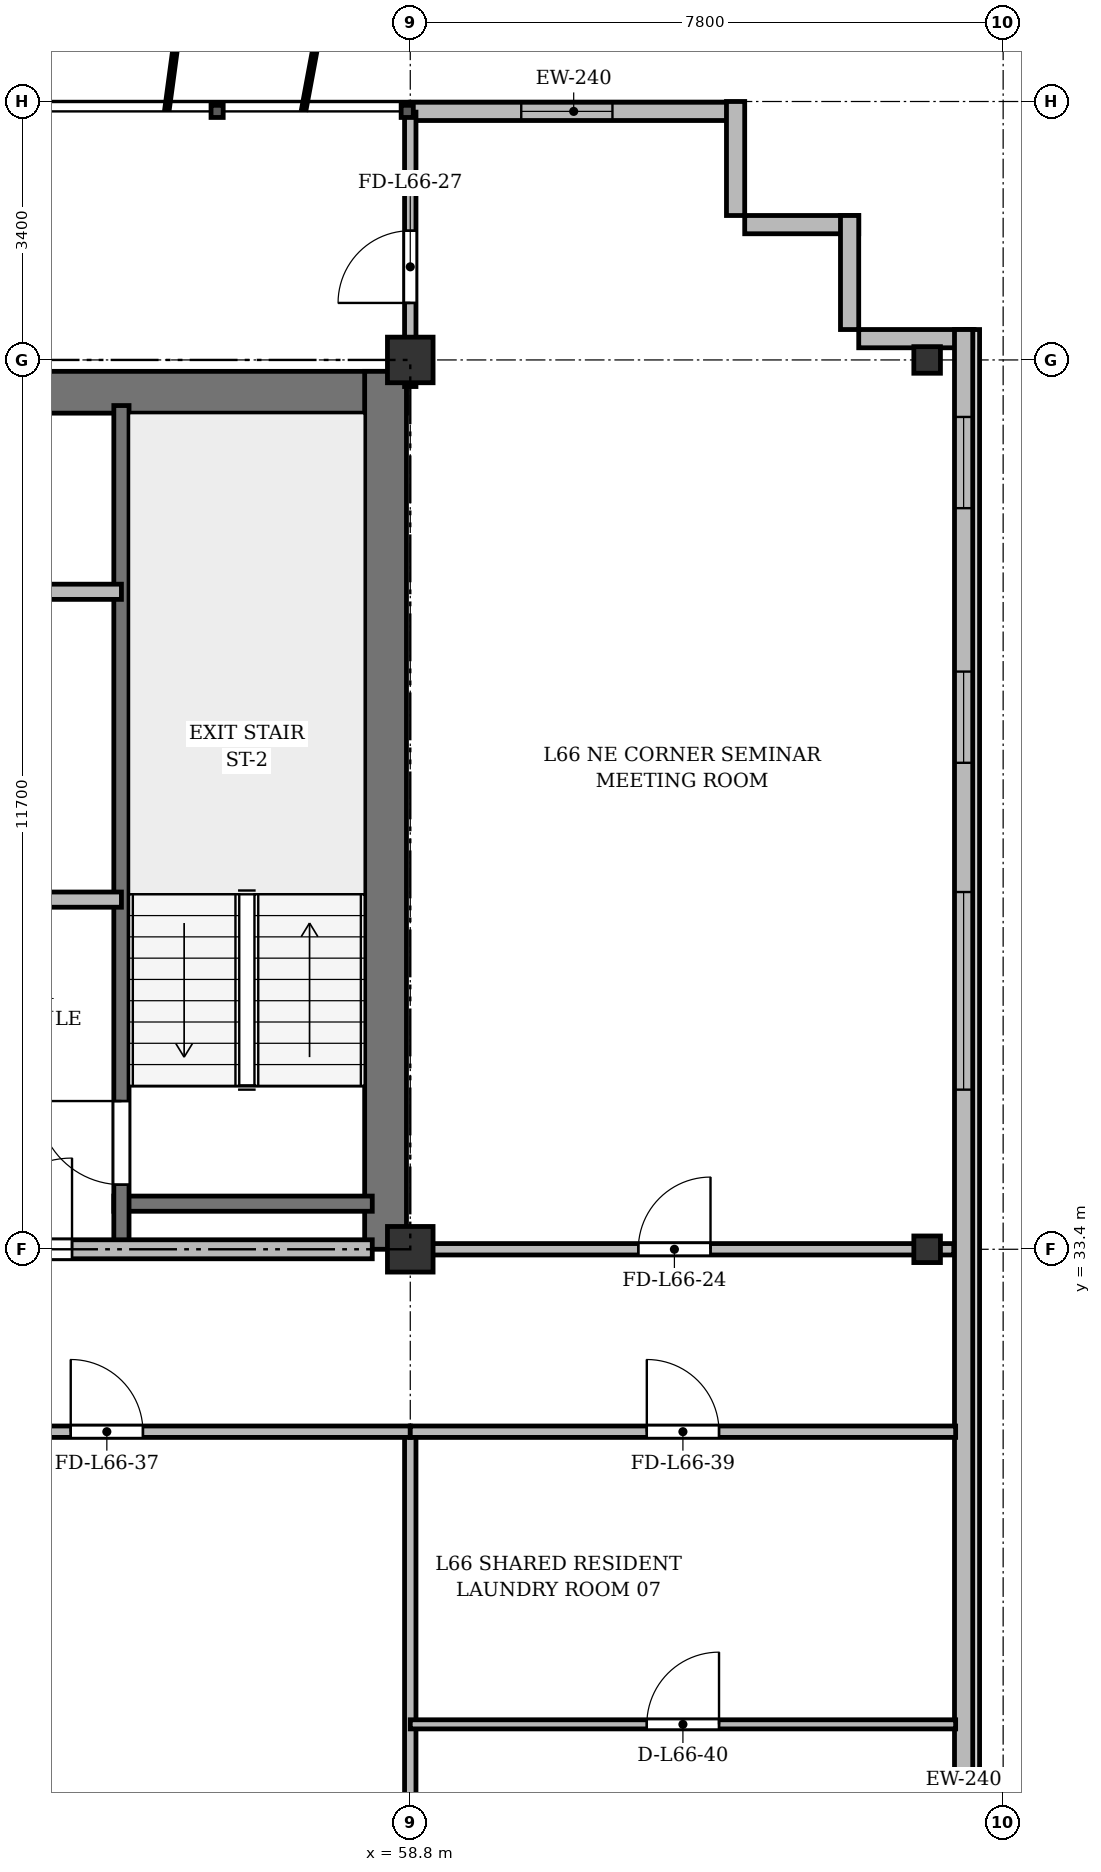
"""IFC4 building model, lengths in metres.
Left out: names, types, materials, properties, quantities, classifications, styles, units other than length and angle.
Written with IfcOpenShell. Run it as: python <this file> out.ifc"""

import sys

from ifc_helpers import new_model, si_unit, direction, frame, frame_2d, origin, origin_2d, place, context, subcontext, project, spatial, rectangle, i_section, extrude, source, transform, mapped, element, fill, save


model = new_model("IFC4")
c1 = context("Model", 3, precision=1e-05, world=origin(), true_north=direction((0.0, 1.0)))
c2 = subcontext(c1, "Body", "Model", "MODEL_VIEW")
j1 = project(units=[si_unit("LENGTHUNIT", "METRE"), si_unit("PLANEANGLEUNIT", "RADIAN")], contexts=[c1])
p1 = place(None, origin())
s1 = spatial("IfcSite", under=j1, at=p1, CompositionType="ELEMENT")
p2 = place(p1, origin())
s2 = spatial("IfcBuilding", under=s1, at=p2, CompositionType="ELEMENT")
p3 = place(p2, frame((0.0, 0.0, 255.9)))
s3 = spatial("IfcBuildingStorey", under=s2, at=p3, CompositionType="ELEMENT", Elevation=255.9)
m1 = source(origin(), c2, "Body", "SweptSolid", [
    extrude(rectangle(XDim=0.6, YDim=0.6, at=origin_2d()), origin(), (0.0, 0.0, 1.0), 3.6),
])
for number, where, z_axis, x_axis in (
    (1, (58.8, 33.4, 0.0), (0.0, 0.0, 1.0), (1.0, 0.0, 0.0)),
    (2, (58.8, 45.1, 0.0), (0.0, 0.0, 1.0), (1.0, 0.0, 0.0)),
):
    element("IfcColumn", number, at=place(p3, frame(where, z_axis=z_axis, x_axis=x_axis)), inside=s3, PredefinedType="COLUMN", context=c2, shape_type="MappedRepresentation", body=[
        mapped(m1, transform((0.0, 0.0, 0.0), x_axis=(1.0, 0.0, 0.0), y_axis=(0.0, 1.0, 0.0), z_axis=(0.0, 0.0, 1.0), scale=1.0)),
    ])
m2 = source(origin(), c2, "Body", "SweptSolid", [
    extrude(i_section(OverallWidth=0.35, OverallDepth=0.35, WebThickness=0.018, FlangeThickness=0.028, at=origin_2d()), origin(), (0.0, 0.0, 1.0), 3.6),
])
for number, where, z_axis, x_axis in (
    (3, (65.6, 33.4, 0.0), (0.0, 0.0, 1.0), (1.0, 0.0, 0.0)),
    (4, (65.6, 45.1, 0.0), (0.0, 0.0, 1.0), (1.0, 0.0, 0.0)),
):
    element("IfcColumn", number, at=place(p3, frame(where, z_axis=z_axis, x_axis=x_axis)), inside=s3, PredefinedType="COLUMN", context=c2, shape_type="MappedRepresentation", body=[
        mapped(m2, transform((0.0, 0.0, 0.0), x_axis=(1.0, 0.0, 0.0), y_axis=(0.0, 1.0, 0.0), z_axis=(0.0, 0.0, 1.0), scale=1.0)),
    ])
p4 = place(p3, frame((58.8, 48.37, 0.0), z_axis=(0.0, 0.0, 1.0), x_axis=(1.0, 0.0, 0.0)))
e5 = element("IfcWall", 5, at=p4, inside=s3, PredefinedType="SOLIDWALL", context=c2, shape_type="SweptSolid", body=[
    extrude(rectangle(XDim=4.3, YDim=0.24, at=frame_2d((2.15, 0.0))), origin(), (0.0, 0.0, 1.0), 3.37),
])
p5 = place(p4, frame((1.46, 0.0, 0.9)))
e6 = element("IfcOpeningElement", 6, at=p5, cuts=e5, PredefinedType="OPENING", context=c2, shape_type="SweptSolid", body=[
    extrude(rectangle(XDim=1.2, YDim=1.65, at=frame_2d((0.6, 0.825))), frame((0.0, 0.13, 0.0), z_axis=(0.0, -1.0, 0.0), x_axis=(1.0, 0.0, 0.0)), (0.0, 0.0, 1.0), 0.26),
])
for number, where, z_axis, x_axis in (
    (7, (63.08, 48.5, 0.0), (0.0, 0.0, 1.0), (0.0, -1.0, 0.0)),
    (8, (63.2, 46.88, 0.0), (0.0, 0.0, 1.0), (1.0, 0.0, 0.0)),
    (9, (64.58, 47.0, 0.0), (0.0, 0.0, 1.0), (0.0, -1.0, 0.0)),
    (10, (64.7, 45.38, 0.0), (0.0, 0.0, 1.0), (1.0, 0.0, 0.0)),
):
    element("IfcWall", number, at=place(p3, frame(where, z_axis=z_axis, x_axis=x_axis)), inside=s3, PredefinedType="SOLIDWALL", context=c2, shape_type="SweptSolid", body=[
        extrude(rectangle(XDim=1.5, YDim=0.24, at=frame_2d((0.75, 0.0))), origin(), (0.0, 0.0, 1.0), 3.37),
    ])
p6 = place(p3, frame((66.08, 45.5, 0.0), z_axis=(0.0, 0.0, 1.0), x_axis=(0.0, -1.0, 0.0)))
e11 = element("IfcWall", 11, at=p6, inside=s3, PredefinedType="SOLIDWALL", context=c2, shape_type="SweptSolid", body=[
    extrude(rectangle(XDim=39.0, YDim=0.24, at=frame_2d((19.5, 0.0))), origin(), (0.0, 0.0, 1.0), 3.37),
])
p7 = place(p6, frame((36.35, 0.0, 0.92)))
e12 = element("IfcOpeningElement", 12, at=p7, cuts=e11, PredefinedType="OPENING", context=c2, shape_type="SweptSolid", body=[
    extrude(rectangle(XDim=1.2, YDim=1.65, at=frame_2d((0.6, 0.825))), frame((0.0, 0.13, 0.0), z_axis=(0.0, -1.0, 0.0), x_axis=(1.0, 0.0, 0.0)), (0.0, 0.0, 1.0), 0.26),
])
p8 = place(p6, frame((32.8, 0.0, 0.92)))
e13 = element("IfcOpeningElement", 13, at=p8, cuts=e11, PredefinedType="OPENING", context=c2, shape_type="SweptSolid", body=[
    extrude(rectangle(XDim=2.6, YDim=1.9, at=frame_2d((1.3, 0.95))), frame((0.0, 0.13, 0.0), z_axis=(0.0, -1.0, 0.0), x_axis=(1.0, 0.0, 0.0)), (0.0, 0.0, 1.0), 0.26),
])
p9 = place(p6, frame((28.6, 0.0, 0.92)))
e14 = element("IfcOpeningElement", 14, at=p9, cuts=e11, PredefinedType="OPENING", context=c2, shape_type="SweptSolid", body=[
    extrude(rectangle(XDim=2.6, YDim=1.9, at=frame_2d((1.3, 0.95))), frame((0.0, 0.13, 0.0), z_axis=(0.0, -1.0, 0.0), x_axis=(1.0, 0.0, 0.0)), (0.0, 0.0, 1.0), 0.26),
])
p10 = place(p6, frame((21.4, 0.0, 0.92)))
e15 = element("IfcOpeningElement", 15, at=p10, cuts=e11, PredefinedType="OPENING", context=c2, shape_type="SweptSolid", body=[
    extrude(rectangle(XDim=2.6, YDim=1.9, at=frame_2d((1.3, 0.95))), frame((0.0, 0.13, 0.0), z_axis=(0.0, -1.0, 0.0), x_axis=(1.0, 0.0, 0.0)), (0.0, 0.0, 1.0), 0.26),
])
p11 = place(p6, frame((7.4, 0.0, 0.92)))
e16 = element("IfcOpeningElement", 16, at=p11, cuts=e11, PredefinedType="OPENING", context=c2, shape_type="SweptSolid", body=[
    extrude(rectangle(XDim=2.6, YDim=1.9, at=frame_2d((1.3, 0.95))), frame((0.0, 0.13, 0.0), z_axis=(0.0, -1.0, 0.0), x_axis=(1.0, 0.0, 0.0)), (0.0, 0.0, 1.0), 0.26),
])
p12 = place(p6, frame((4.5, 0.0, 0.92)))
e17 = element("IfcOpeningElement", 17, at=p12, cuts=e11, PredefinedType="OPENING", context=c2, shape_type="SweptSolid", body=[
    extrude(rectangle(XDim=1.2, YDim=1.65, at=frame_2d((0.6, 0.825))), frame((0.0, 0.13, 0.0), z_axis=(0.0, -1.0, 0.0), x_axis=(1.0, 0.0, 0.0)), (0.0, 0.0, 1.0), 0.26),
])
p13 = place(p6, frame((1.15, 0.0, 0.92)))
e18 = element("IfcOpeningElement", 18, at=p13, cuts=e11, PredefinedType="OPENING", context=c2, shape_type="SweptSolid", body=[
    extrude(rectangle(XDim=1.2, YDim=1.65, at=frame_2d((0.6, 0.825))), frame((0.0, 0.13, 0.0), z_axis=(0.0, -1.0, 0.0), x_axis=(1.0, 0.0, 0.0)), (0.0, 0.0, 1.0), 0.26),
])
p14 = place(p3, frame((15.65, 44.675, 0.0), z_axis=(0.0, 0.0, 1.0), x_axis=(1.0, 0.0, 0.0)))
e19 = element("IfcWall", 19, at=p14, inside=s3, PredefinedType="SHEAR", context=c2, shape_type="SweptSolid", body=[
    extrude(rectangle(XDim=43.1, YDim=0.55, at=frame_2d((21.55, 0.0))), origin(), (0.0, 0.0, 1.0), 3.37),
])
p15 = place(p3, frame((58.475, 33.4, 0.0), z_axis=(0.0, 0.0, 1.0), x_axis=(0.0, 1.0, 0.0)))
e20 = element("IfcWall", 20, at=p15, inside=s3, PredefinedType="SHEAR", context=c2, shape_type="SweptSolid", body=[
    extrude(rectangle(XDim=11.55, YDim=0.55, at=frame_2d((5.775, 0.0))), origin(), (0.0, 0.0, 1.0), 3.37),
])
p16 = place(p3, frame((54.9, 34.0, 0.0), z_axis=(0.0, 0.0, 1.0), x_axis=(1.0, 0.0, 0.0)))
e21 = element("IfcWall", 21, at=p16, inside=s3, PredefinedType="SHEAR", context=c2, shape_type="SweptSolid", body=[
    extrude(rectangle(XDim=3.4, YDim=0.2, at=frame_2d((1.7, 0.0))), origin(), (0.0, 0.0, 1.0), 3.37),
])
p17 = place(p3, frame((55.0, 33.4, 0.0), z_axis=(0.0, 0.0, 1.0), x_axis=(0.0, 1.0, 0.0)))
e22 = element("IfcWall", 22, at=p17, inside=s3, PredefinedType="SHEAR", context=c2, shape_type="SweptSolid", body=[
    extrude(rectangle(XDim=11.1, YDim=0.2, at=frame_2d((5.55, 0.0))), origin(), (0.0, 0.0, 1.0), 3.37),
])
p18 = place(p17, frame((0.85, 0.0, 0.0)))
e23 = element("IfcOpeningElement", 23, at=p18, cuts=e22, PredefinedType="OPENING", context=c2, shape_type="SweptSolid", body=[
    extrude(rectangle(XDim=1.1, YDim=2.15, at=frame_2d((0.55, 1.075))), frame((0.0, 0.11, 0.0), z_axis=(0.0, -1.0, 0.0), x_axis=(1.0, 0.0, 0.0)), (0.0, 0.0, 1.0), 0.22),
])
p19 = place(p3, frame((47.15, 42.05, 0.0), z_axis=(0.0, 0.0, 1.0), x_axis=(1.0, 0.0, 0.0)))
e24 = element("IfcWall", 24, at=p19, inside=s3, PredefinedType="SOLIDWALL", context=c2, shape_type="SweptSolid", body=[
    extrude(rectangle(XDim=7.85, YDim=0.2, at=frame_2d((3.925, 0.0))), origin(), (0.0, 0.0, 1.0), 2.87),
])
p20 = place(p19, frame((0.75, 0.0, 0.0)))
e25 = element("IfcOpeningElement", 25, at=p20, cuts=e24, PredefinedType="OPENING", context=c2, shape_type="SweptSolid", body=[
    extrude(rectangle(XDim=0.9, YDim=2.1, at=frame_2d((0.45, 1.05))), frame((0.0, 0.11, 0.0), z_axis=(0.0, -1.0, 0.0), x_axis=(1.0, 0.0, 0.0)), (0.0, 0.0, 1.0), 0.22),
])
p21 = place(p19, frame((3.85, 0.0, 0.0)))
e26 = element("IfcOpeningElement", 26, at=p21, cuts=e24, PredefinedType="OPENING", context=c2, shape_type="SweptSolid", body=[
    extrude(rectangle(XDim=0.9, YDim=2.1, at=frame_2d((0.45, 1.05))), frame((0.0, 0.11, 0.0), z_axis=(0.0, -1.0, 0.0), x_axis=(1.0, 0.0, 0.0)), (0.0, 0.0, 1.0), 0.22),
])
p22 = place(p3, frame((52.45, 38.0, 0.0), z_axis=(0.0, 0.0, 1.0), x_axis=(1.0, 0.0, 0.0)))
e27 = element("IfcWall", 27, at=p22, inside=s3, PredefinedType="PARTITIONING", context=c2, shape_type="SweptSolid", body=[
    extrude(rectangle(XDim=2.55, YDim=0.2, at=frame_2d((1.275, 0.0))), origin(), (0.0, 0.0, 1.0), 3.37),
])
p23 = place(p3, frame((47.15, 33.4, 0.0), z_axis=(0.0, 0.0, 1.0), x_axis=(1.0, 0.0, 0.0)))
e28 = element("IfcWall", 28, at=p23, inside=s3, PredefinedType="PARTITIONING", context=c2, shape_type="SweptSolid", body=[
    extrude(rectangle(XDim=11.15, YDim=0.25, at=frame_2d((5.575, 0.0))), origin(), (0.0, 0.0, 1.0), 2.92),
])
p24 = place(p23, frame((0.7, 0.0, 0.0)))
e29 = element("IfcOpeningElement", 29, at=p24, cuts=e28, PredefinedType="OPENING", context=c2, shape_type="SweptSolid", body=[
    extrude(rectangle(XDim=0.95, YDim=2.15, at=frame_2d((0.475, 1.075))), frame((0.0, 0.135, 0.0), z_axis=(0.0, -1.0, 0.0), x_axis=(1.0, 0.0, 0.0)), (0.0, 0.0, 1.0), 0.27),
])
p25 = place(p23, frame((6.0, 0.0, 0.0)))
e30 = element("IfcOpeningElement", 30, at=p25, cuts=e28, PredefinedType="OPENING", context=c2, shape_type="SweptSolid", body=[
    extrude(rectangle(XDim=1.2, YDim=2.15, at=frame_2d((0.6, 1.075))), frame((0.0, 0.135, 0.0), z_axis=(0.0, -1.0, 0.0), x_axis=(1.0, 0.0, 0.0)), (0.0, 0.0, 1.0), 0.27),
])
p26 = place(p3, frame((58.8, 33.4, 0.0), z_axis=(0.0, 0.0, 1.0), x_axis=(1.0, 0.0, 0.0)))
e31 = element("IfcWall", 31, at=p26, inside=s3, PredefinedType="PARTITIONING", context=c2, shape_type="SweptSolid", body=[
    extrude(rectangle(XDim=7.15, YDim=0.15, at=frame_2d((3.575, 0.0))), origin(), (0.0, 0.0, 1.0), 2.92),
])
p27 = place(p26, frame((3.0, 0.0, 0.0)))
e32 = element("IfcOpeningElement", 32, at=p27, cuts=e31, PredefinedType="OPENING", context=c2, shape_type="SweptSolid", body=[
    extrude(rectangle(XDim=0.95, YDim=2.15, at=frame_2d((0.475, 1.075))), frame((0.0, 0.085, 0.0), z_axis=(0.0, -1.0, 0.0), x_axis=(1.0, 0.0, 0.0)), (0.0, 0.0, 1.0), 0.17),
])
p28 = place(p3, frame((58.8, 44.75, 0.0), z_axis=(0.0, 0.0, 1.0), x_axis=(0.0, 1.0, 0.0)))
e33 = element("IfcWall", 33, at=p28, inside=s3, PredefinedType="PARTITIONING", context=c2, shape_type="SweptSolid", body=[
    extrude(rectangle(XDim=3.61, YDim=0.15, at=frame_2d((1.805, 0.0))), origin(), (0.0, 0.0, 1.0), 2.87),
])
p29 = place(p28, frame((1.1, 0.0, 0.0)))
e34 = element("IfcOpeningElement", 34, at=p29, cuts=e33, PredefinedType="OPENING", context=c2, shape_type="SweptSolid", body=[
    extrude(rectangle(XDim=0.95, YDim=2.15, at=frame_2d((0.475, 1.075))), frame((0.0, 0.085, 0.0), z_axis=(0.0, -1.0, 0.0), x_axis=(1.0, 0.0, 0.0)), (0.0, 0.0, 1.0), 0.17),
])
p30 = place(p3, frame((58.8, 3.725, 0.0), z_axis=(0.0, 0.0, 1.0), x_axis=(0.0, 1.0, 0.0)))
e35 = element("IfcWall", 35, at=p30, inside=s3, PredefinedType="PARTITIONING", context=c2, shape_type="SweptSolid", body=[
    extrude(rectangle(XDim=27.275, YDim=0.15, at=frame_2d((13.637, 0.0))), origin(), (0.0, 0.0, 1.0), 2.87),
])
p31 = place(p3, frame((51.0, 31.0, 0.0), z_axis=(0.0, 0.0, 1.0), x_axis=(1.0, 0.0, 0.0)))
e36 = element("IfcWall", 36, at=p31, inside=s3, PredefinedType="PARTITIONING", context=c2, shape_type="SweptSolid", body=[
    extrude(rectangle(XDim=7.8, YDim=0.15, at=frame_2d((3.9, 0.0))), origin(), (0.0, 0.0, 1.0), 2.87),
])
p32 = place(p31, frame((3.333, 0.0, 0.0)))
e37 = element("IfcOpeningElement", 37, at=p32, cuts=e36, PredefinedType="OPENING", context=c2, shape_type="SweptSolid", body=[
    extrude(rectangle(XDim=0.95, YDim=2.15, at=frame_2d((0.475, 1.075))), frame((0.0, 0.085, 0.0), z_axis=(0.0, -1.0, 0.0), x_axis=(1.0, 0.0, 0.0)), (0.0, 0.0, 1.0), 0.17),
])
p33 = place(p3, frame((58.8, 31.0, 0.0), z_axis=(0.0, 0.0, 1.0), x_axis=(1.0, 0.0, 0.0)))
e38 = element("IfcWall", 38, at=p33, inside=s3, PredefinedType="PARTITIONING", context=c2, shape_type="SweptSolid", body=[
    extrude(rectangle(XDim=7.175, YDim=0.15, at=frame_2d((3.587, 0.0))), origin(), (0.0, 0.0, 1.0), 2.87),
])
p34 = place(p33, frame((3.112, 0.0, 0.0)))
e39 = element("IfcOpeningElement", 39, at=p34, cuts=e38, PredefinedType="OPENING", context=c2, shape_type="SweptSolid", body=[
    extrude(rectangle(XDim=0.95, YDim=2.15, at=frame_2d((0.475, 1.075))), frame((0.0, 0.085, 0.0), z_axis=(0.0, -1.0, 0.0), x_axis=(1.0, 0.0, 0.0)), (0.0, 0.0, 1.0), 0.17),
])
p35 = place(p3, frame((58.8, 27.15, 0.0), z_axis=(0.0, 0.0, 1.0), x_axis=(1.0, 0.0, 0.0)))
e40 = element("IfcWall", 40, at=p35, inside=s3, PredefinedType="PARTITIONING", context=c2, shape_type="SweptSolid", body=[
    extrude(rectangle(XDim=7.175, YDim=0.12, at=frame_2d((3.587, 0.0))), origin(), (0.0, 0.0, 1.0), 2.87),
])
p36 = place(p35, frame((3.112, 0.0, 0.0)))
e41 = element("IfcOpeningElement", 41, at=p36, cuts=e40, PredefinedType="OPENING", context=c2, shape_type="SweptSolid", body=[
    extrude(rectangle(XDim=0.95, YDim=2.15, at=frame_2d((0.475, 1.075))), frame((0.0, 0.07, 0.0), z_axis=(0.0, -1.0, 0.0), x_axis=(1.0, 0.0, 0.0)), (0.0, 0.0, 1.0), 0.14),
])
m3 = source(origin(), c2, "Body", "SweptSolid", [
    extrude(rectangle(XDim=1.2, YDim=1.65, at=frame_2d((0.6, 0.825))), frame((0.0, 0.03, 0.0), z_axis=(0.0, -1.0, 0.0), x_axis=(1.0, 0.0, 0.0)), (0.0, 0.0, 1.0), 0.06),
])
p37 = place(p5, origin())
e42 = element("IfcWindow", 42, at=p37, inside=s3, PartitioningType="SINGLE_PANEL", PredefinedType="WINDOW", context=c2, shape_type="MappedRepresentation", body=[
    mapped(m3, transform((0.0, 0.0, 0.0), x_axis=(1.0, 0.0, 0.0), y_axis=(0.0, 1.0, 0.0), z_axis=(0.0, 0.0, 1.0), scale=1.0)),
])
fill(e6, e42)
m4 = source(origin(), c2, "Body", "SweptSolid", [
    extrude(rectangle(XDim=2.6, YDim=1.9, at=frame_2d((1.3, 0.95))), frame((0.0, 0.03, 0.0), z_axis=(0.0, -1.0, 0.0), x_axis=(1.0, 0.0, 0.0)), (0.0, 0.0, 1.0), 0.06),
])
p38 = place(p11, origin())
e43 = element("IfcWindow", 43, at=p38, inside=s3, PartitioningType="SINGLE_PANEL", PredefinedType="WINDOW", context=c2, shape_type="MappedRepresentation", body=[
    mapped(m4, transform((0.0, 0.0, 0.0), x_axis=(1.0, 0.0, 0.0), y_axis=(0.0, 1.0, 0.0), z_axis=(0.0, 0.0, 1.0), scale=1.0)),
])
fill(e16, e43)
p39 = place(p12, origin())
e44 = element("IfcWindow", 44, at=p39, inside=s3, PartitioningType="SINGLE_PANEL", PredefinedType="WINDOW", context=c2, shape_type="MappedRepresentation", body=[
    mapped(m3, transform((0.0, 0.0, 0.0), x_axis=(1.0, 0.0, 0.0), y_axis=(0.0, 1.0, 0.0), z_axis=(0.0, 0.0, 1.0), scale=1.0)),
])
fill(e17, e44)
p40 = place(p13, origin())
e45 = element("IfcWindow", 45, at=p40, inside=s3, PartitioningType="SINGLE_PANEL", PredefinedType="WINDOW", context=c2, shape_type="MappedRepresentation", body=[
    mapped(m3, transform((0.0, 0.0, 0.0), x_axis=(1.0, 0.0, 0.0), y_axis=(0.0, 1.0, 0.0), z_axis=(0.0, 0.0, 1.0), scale=1.0)),
])
fill(e18, e45)
m5 = source(origin(), c2, "Body", "SweptSolid", [
    extrude(rectangle(XDim=1.1, YDim=2.15, at=frame_2d((0.55, 1.075))), frame((0.0, 0.025, 0.0), z_axis=(0.0, -1.0, 0.0), x_axis=(1.0, 0.0, 0.0)), (0.0, 0.0, 1.0), 0.05),
])
p41 = place(p18, origin())
e46 = element("IfcDoor", 46, at=p41, inside=s3, OperationType="SINGLE_SWING_RIGHT", PredefinedType="DOOR", context=c2, shape_type="MappedRepresentation", body=[
    mapped(m5, transform((0.0, 0.0, 0.0), x_axis=(1.0, 0.0, 0.0), y_axis=(0.0, 1.0, 0.0), z_axis=(0.0, 0.0, 1.0), scale=1.0)),
])
fill(e23, e46)
m6 = source(origin(), c2, "Body", "SweptSolid", [
    extrude(rectangle(XDim=1.2, YDim=2.15, at=frame_2d((0.6, 1.075))), frame((0.0, 0.025, 0.0), z_axis=(0.0, -1.0, 0.0), x_axis=(1.0, 0.0, 0.0)), (0.0, 0.0, 1.0), 0.05),
])
p42 = place(p25, origin())
e47 = element("IfcDoor", 47, at=p42, inside=s3, OperationType="SINGLE_SWING_RIGHT", PredefinedType="DOOR", context=c2, shape_type="MappedRepresentation", body=[
    mapped(m6, transform((0.0, 0.0, 0.0), x_axis=(1.0, 0.0, 0.0), y_axis=(0.0, 1.0, 0.0), z_axis=(0.0, 0.0, 1.0), scale=1.0)),
])
fill(e30, e47)
m7 = source(origin(), c2, "Body", "SweptSolid", [
    extrude(rectangle(XDim=0.95, YDim=2.15, at=frame_2d((0.475, 1.075))), frame((0.0, 0.025, 0.0), z_axis=(0.0, -1.0, 0.0), x_axis=(1.0, 0.0, 0.0)), (0.0, 0.0, 1.0), 0.05),
])
p43 = place(p27, origin())
e48 = element("IfcDoor", 48, at=p43, inside=s3, OperationType="SINGLE_SWING_RIGHT", PredefinedType="DOOR", context=c2, shape_type="MappedRepresentation", body=[
    mapped(m7, transform((0.0, 0.0, 0.0), x_axis=(1.0, 0.0, 0.0), y_axis=(0.0, 1.0, 0.0), z_axis=(0.0, 0.0, 1.0), scale=1.0)),
])
fill(e32, e48)
p44 = place(p29, origin())
e49 = element("IfcDoor", 49, at=p44, inside=s3, OperationType="SINGLE_SWING_LEFT", PredefinedType="DOOR", context=c2, shape_type="MappedRepresentation", body=[
    mapped(m7, transform((0.0, 0.0, 0.0), x_axis=(1.0, 0.0, 0.0), y_axis=(0.0, 1.0, 0.0), z_axis=(0.0, 0.0, 1.0), scale=1.0)),
])
fill(e34, e49)
p45 = place(p32, origin())
e50 = element("IfcDoor", 50, at=p45, inside=s3, OperationType="SINGLE_SWING_LEFT", PredefinedType="DOOR", context=c2, shape_type="MappedRepresentation", body=[
    mapped(m7, transform((0.0, 0.0, 0.0), x_axis=(1.0, 0.0, 0.0), y_axis=(0.0, 1.0, 0.0), z_axis=(0.0, 0.0, 1.0), scale=1.0)),
])
fill(e37, e50)
p46 = place(p34, origin())
e51 = element("IfcDoor", 51, at=p46, inside=s3, OperationType="SINGLE_SWING_LEFT", PredefinedType="DOOR", context=c2, shape_type="MappedRepresentation", body=[
    mapped(m7, transform((0.0, 0.0, 0.0), x_axis=(1.0, 0.0, 0.0), y_axis=(0.0, 1.0, 0.0), z_axis=(0.0, 0.0, 1.0), scale=1.0)),
])
fill(e39, e51)
p47 = place(p36, origin())
e52 = element("IfcDoor", 52, at=p47, inside=s3, OperationType="SINGLE_SWING_RIGHT", PredefinedType="DOOR", context=c2, shape_type="MappedRepresentation", body=[
    mapped(m7, transform((0.0, 0.0, 0.0), x_axis=(1.0, 0.0, 0.0), y_axis=(0.0, 1.0, 0.0), z_axis=(0.0, 0.0, 1.0), scale=1.0)),
])
fill(e41, e52)
save(model, sys.argv[1])
